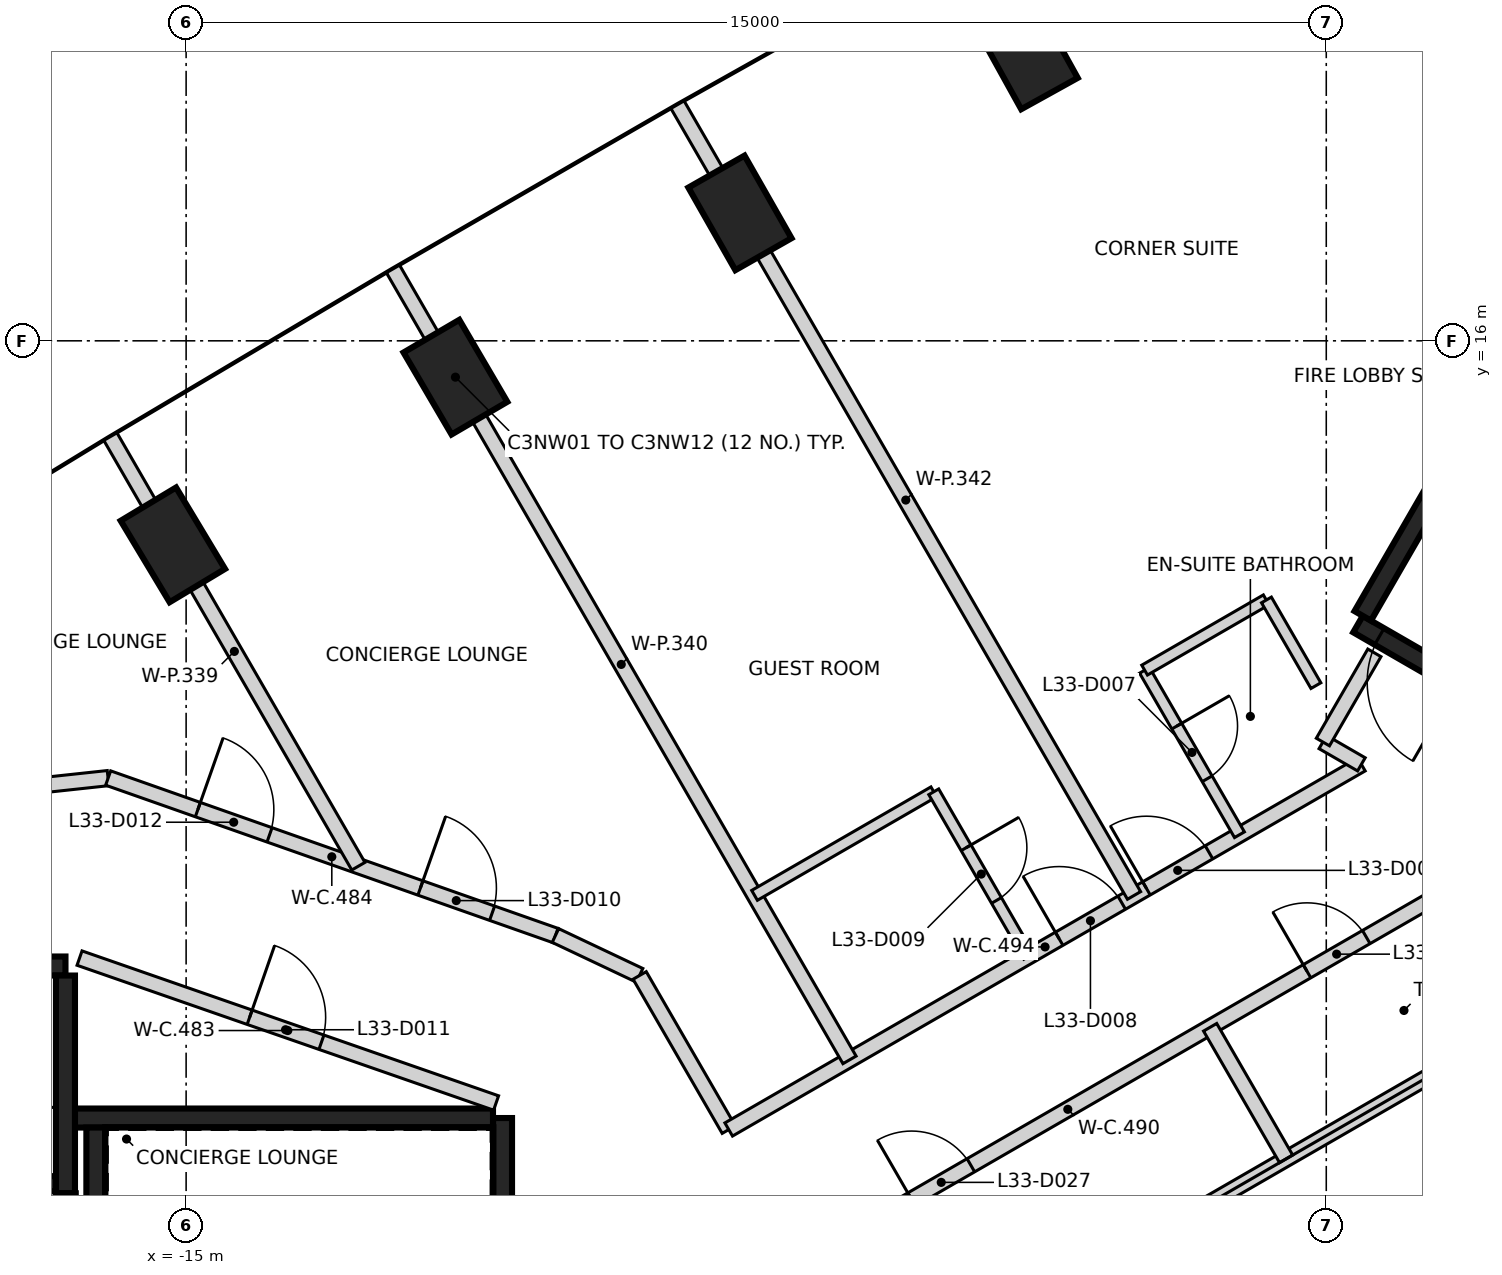
"""IFC4 building model, lengths in metres.
Left out: names, types, materials, properties, quantities, classifications, styles, units other than length and angle.
Written with IfcOpenShell. Run it as: python <this file> out.ifc"""

import sys

from ifc_helpers import new_model, si_unit, direction, frame, frame_2d, origin, origin_2d, place, context, subcontext, project, spatial, rectangle, extrude, element, fill, save


model = new_model("IFC4")
c1 = context("Model", 3, precision=1e-05, world=origin(), true_north=direction((0.0, 1.0)))
c2 = subcontext(c1, "Body", "Model", "MODEL_VIEW")
j1 = project(units=[si_unit("LENGTHUNIT", "METRE"), si_unit("PLANEANGLEUNIT", "RADIAN")], contexts=[c1])
p1 = place(None, origin())
s1 = spatial("IfcSite", under=j1, at=p1, CompositionType="ELEMENT")
p2 = place(p1, origin())
s2 = spatial("IfcBuilding", under=s1, at=p2, CompositionType="ELEMENT")
p3 = place(p2, frame((0.0, 0.0, 136.0)))
s3 = spatial("IfcBuildingStorey", under=s2, at=p3, CompositionType="ELEMENT", Elevation=136.0)
for number, where, z_axis, x_axis in (
    (1, (-3.945, 19.8, -0.4), (0.0, 0.0, 1.0), (-0.485, 0.875, 0.0)),
    (2, (-7.714, 17.683, -0.4), (0.0, 0.0, 1.0), (-0.495, 0.869, 0.0)),
    (3, (-11.457, 15.522, -0.4), (0.0, 0.0, 1.0), (-0.505, 0.863, 0.0)),
    (4, (-15.175, 13.316, -0.4), (0.0, 0.0, 1.0), (-0.515, 0.857, 0.0)),
):
    element("IfcColumn", number, at=place(p3, frame(where, z_axis=z_axis, x_axis=x_axis)), inside=s3, PredefinedType="COLUMN", context=c2, shape_type="SweptSolid", body=[
        extrude(rectangle(XDim=1.25, YDim=0.85, at=origin_2d()), origin(), (0.0, 0.0, 1.0), 3.6),
    ])
p4 = place(p3, frame((-10.837, 5.775, 0.0), z_axis=(0.0, 0.0, 1.0), x_axis=(0.0, -1.0, 0.0)))
e5 = element("IfcWall", 5, at=p4, inside=s3, PredefinedType="SHEAR", context=c2, shape_type="SweptSolid", body=[
    extrude(rectangle(XDim=11.55, YDim=0.25, at=frame_2d((5.775, 0.0))), origin(), (0.0, 0.0, 1.0), 3.2),
])
p5 = place(p4, frame((10.025, 0.0, 0.0)))
e6 = element("IfcOpeningElement", 6, at=p5, cuts=e5, PredefinedType="OPENING", context=c2, shape_type="SweptSolid", body=[
    extrude(rectangle(XDim=1.2, YDim=2.1, at=frame_2d((0.6, 1.05))), frame((0.0, 0.135, 0.0), z_axis=(0.0, -1.0, 0.0), x_axis=(1.0, 0.0, 0.0)), (0.0, 0.0, 1.0), 0.27),
])
p6 = place(p4, frame((8.725, 0.0, 0.0)))
e7 = element("IfcOpeningElement", 7, at=p6, cuts=e5, PredefinedType="OPENING", context=c2, shape_type="SweptSolid", body=[
    extrude(rectangle(XDim=1.2, YDim=2.1, at=frame_2d((0.6, 1.05))), frame((0.0, 0.135, 0.0), z_axis=(0.0, -1.0, 0.0), x_axis=(1.0, 0.0, 0.0)), (0.0, 0.0, 1.0), 0.27),
])
p7 = place(p3, frame((-16.472, 5.775, 0.0), z_axis=(0.0, 0.0, 1.0), x_axis=(1.0, 0.0, 0.0)))
e8 = element("IfcWall", 8, at=p7, inside=s3, PredefinedType="SHEAR", context=c2, shape_type="SweptSolid", body=[
    extrude(rectangle(XDim=5.51, YDim=0.25, at=frame_2d((2.755, 0.0))), origin(), (0.0, 0.0, 1.0), 3.2),
])
p8 = place(p3, frame((-19.637, 7.775, 0.0), z_axis=(0.0, 0.0, 1.0), x_axis=(1.0, 0.0, 0.0)))
e9 = element("IfcWall", 9, at=p8, inside=s3, PredefinedType="SHEAR", context=c2, shape_type="SweptSolid", body=[
    extrude(rectangle(XDim=3.05, YDim=0.25, at=frame_2d((1.525, 0.0))), origin(), (0.0, 0.0, 1.0), 3.2),
])
p9 = place(p3, frame((-16.587, 7.65, 0.0), z_axis=(0.0, 0.0, 1.0), x_axis=(0.0, -1.0, 0.0)))
e10 = element("IfcWall", 10, at=p9, inside=s3, PredefinedType="SHEAR", context=c2, shape_type="SweptSolid", body=[
    extrude(rectangle(XDim=2.865, YDim=0.25, at=frame_2d((1.432, 0.0))), origin(), (0.0, 0.0, 1.0), 3.2),
])
p10 = place(p3, frame((-16.187, 3.2, 0.0), z_axis=(0.0, 0.0, 1.0), x_axis=(0.0, 1.0, 0.0)))
e11 = element("IfcWall", 11, at=p10, inside=s3, PredefinedType="SHEAR", context=c2, shape_type="SweptSolid", body=[
    extrude(rectangle(XDim=2.449, YDim=0.25, at=frame_2d((1.225, 0.0))), origin(), (0.0, 0.0, 1.0), 3.2),
])
p11 = place(p3, frame((-16.577, 4.785, 0.0), z_axis=(0.0, 0.0, 1.0), x_axis=(0.0, -1.0, 0.0)))
e12 = element("IfcWall", 12, at=p11, inside=s3, PredefinedType="SHEAR", context=c2, shape_type="SweptSolid", body=[
    extrude(rectangle(XDim=0.344, YDim=0.25, at=frame_2d((0.172, 0.0))), origin(), (0.0, 0.0, 1.0), 3.2),
])
p12 = place(p3, frame((-19.511, 4.91, 0.0), z_axis=(0.0, 0.0, 1.0), x_axis=(1.0, 0.0, 0.0)))
e13 = element("IfcWall", 13, at=p12, inside=s3, PredefinedType="SHEAR", context=c2, shape_type="SweptSolid", body=[
    extrude(rectangle(XDim=2.798, YDim=0.2, at=frame_2d((1.399, 0.0))), origin(), (0.0, 0.0, 1.0), 3.2),
])
p13 = place(p12, frame((0.949, 0.0, 0.0)))
e14 = element("IfcOpeningElement", 14, at=p13, cuts=e13, PredefinedType="OPENING", context=c2, shape_type="SweptSolid", body=[
    extrude(rectangle(XDim=0.9, YDim=2.1, at=frame_2d((0.45, 1.05))), frame((0.0, 0.11, 0.0), z_axis=(0.0, -1.0, 0.0), x_axis=(1.0, 0.0, 0.0)), (0.0, 0.0, 1.0), 0.22),
])
p14 = place(p3, frame((10.42, 6.498, 0.0), z_axis=(0.0, 0.0, 1.0), x_axis=(-0.866021906294, 0.500006057782, 0.0)))
e15 = element("IfcWall", 15, at=p14, inside=s3, PredefinedType="SHEAR", context=c2, shape_type="SweptSolid", body=[
    extrude(rectangle(XDim=11.55, YDim=0.25, at=frame_2d((5.775, 0.0))), origin(), (0.0, 0.0, 1.0), 3.2),
])
p15 = place(p14, frame((10.025, 0.0, 0.0)))
e16 = element("IfcOpeningElement", 16, at=p15, cuts=e15, PredefinedType="OPENING", context=c2, shape_type="SweptSolid", body=[
    extrude(rectangle(XDim=1.2, YDim=2.1, at=frame_2d((0.6, 1.05))), frame((0.0, 0.135, 0.0), z_axis=(0.0, -1.0, 0.0), x_axis=(1.0, 0.0, 0.0)), (0.0, 0.0, 1.0), 0.27),
])
p16 = place(p14, frame((8.725, 0.0, 0.0)))
e17 = element("IfcOpeningElement", 17, at=p16, cuts=e15, PredefinedType="OPENING", context=c2, shape_type="SweptSolid", body=[
    extrude(rectangle(XDim=1.2, YDim=2.1, at=frame_2d((0.6, 1.05))), frame((0.0, 0.135, 0.0), z_axis=(0.0, -1.0, 0.0), x_axis=(1.0, 0.0, 0.0)), (0.0, 0.0, 1.0), 0.27),
])
p17 = place(p3, frame((0.48, 12.381, 0.0), z_axis=(0.0, 0.0, 1.0), x_axis=(0.49999885962, 0.866026062182, 0.0)))
e18 = element("IfcWall", 18, at=p17, inside=s3, PredefinedType="SHEAR", context=c2, shape_type="SweptSolid", body=[
    extrude(rectangle(XDim=5.225, YDim=0.25, at=frame_2d((2.612, 0.0))), origin(), (0.0, 0.0, 1.0), 3.2),
])
p18 = place(p3, frame((-18.865, 9.941, 0.0), z_axis=(0.0, 0.0, 1.0), x_axis=(0.99423123086, 0.107257911519, 0.0)))
e19 = element("IfcWall", 19, at=p18, inside=s3, PredefinedType="PARTITIONING", context=c2, shape_type="SweptSolid", body=[
    extrude(rectangle(XDim=2.854, YDim=0.2, at=frame_2d((1.427, 0.0))), origin(), (0.0, 0.0, 1.0), 3.2),
])
p19 = place(p3, frame((-16.402, 7.879, 0.0), z_axis=(0.0, 0.0, 1.0), x_axis=(0.944492255471, -0.328533680702, 0.0)))
e20 = element("IfcWall", 20, at=p19, inside=s3, PredefinedType="PARTITIONING", context=c2, shape_type="SweptSolid", body=[
    extrude(rectangle(XDim=5.802, YDim=0.2, at=frame_2d((2.901, 0.0))), origin(), (0.0, 0.0, 1.0), 3.2),
])
p20 = place(p19, frame((2.37, 0.0, 0.0)))
e21 = element("IfcOpeningElement", 21, at=p20, cuts=e20, PredefinedType="OPENING", context=c2, shape_type="SweptSolid", body=[
    extrude(rectangle(XDim=1.0, YDim=2.1, at=frame_2d((0.5, 1.05))), frame((0.0, 0.11, 0.0), z_axis=(0.0, -1.0, 0.0), x_axis=(1.0, 0.0, 0.0)), (0.0, 0.0, 1.0), 0.22),
])
p21 = place(p3, frame((-16.026, 10.248, 0.0), z_axis=(0.0, 0.0, 1.0), x_axis=(0.943234993827, -0.332126100179, 0.0)))
e22 = element("IfcWall", 22, at=p21, inside=s3, PredefinedType="PARTITIONING", context=c2, shape_type="SweptSolid", body=[
    extrude(rectangle(XDim=6.239, YDim=0.2, at=frame_2d((3.119, 0.0))), origin(), (0.0, 0.0, 1.0), 3.2),
])
p22 = place(p21, frame((4.355, 0.0, 0.0)))
e23 = element("IfcOpeningElement", 23, at=p22, cuts=e22, PredefinedType="OPENING", context=c2, shape_type="SweptSolid", body=[
    extrude(rectangle(XDim=1.0, YDim=2.1, at=frame_2d((0.5, 1.05))), frame((0.0, 0.11, 0.0), z_axis=(0.0, -1.0, 0.0), x_axis=(1.0, 0.0, 0.0)), (0.0, 0.0, 1.0), 0.22),
])
p23 = place(p21, frame((1.251, 0.0, 0.0)))
e24 = element("IfcOpeningElement", 24, at=p23, cuts=e22, PredefinedType="OPENING", context=c2, shape_type="SweptSolid", body=[
    extrude(rectangle(XDim=1.0, YDim=2.1, at=frame_2d((0.5, 1.05))), frame((0.0, 0.11, 0.0), z_axis=(0.0, -1.0, 0.0), x_axis=(1.0, 0.0, 0.0)), (0.0, 0.0, 1.0), 0.22),
])
p24 = place(p3, frame((-10.141, 8.176, 0.0), z_axis=(0.0, 0.0, 1.0), x_axis=(0.903904169039, -0.427735026849, 0.0)))
e25 = element("IfcWall", 25, at=p24, inside=s3, PredefinedType="PARTITIONING", context=c2, shape_type="SweptSolid", body=[
    extrude(rectangle(XDim=1.225, YDim=0.2, at=frame_2d((0.612, 0.0))), origin(), (0.0, 0.0, 1.0), 3.2),
])
p25 = place(p3, frame((-9.033, 7.651, 0.0), z_axis=(0.0, 0.0, 1.0), x_axis=(0.500354010599, -0.865820919173, 0.0)))
e26 = element("IfcWall", 26, at=p25, inside=s3, PredefinedType="PARTITIONING", context=c2, shape_type="SweptSolid", body=[
    extrude(rectangle(XDim=2.342, YDim=0.2, at=frame_2d((1.171, 0.0))), origin(), (0.0, 0.0, 1.0), 3.2),
])
p26 = place(p3, frame((-8.613, 2.881, 0.0), z_axis=(0.0, 0.0, 1.0), x_axis=(0.866103179807, 0.499865263774, 0.0)))
e27 = element("IfcWall", 27, at=p26, inside=s3, PredefinedType="PARTITIONING", context=c2, shape_type="SweptSolid", body=[
    extrude(rectangle(XDim=12.036, YDim=0.2, at=frame_2d((6.018, 0.0))), origin(), (0.0, 0.0, 1.0), 3.2),
])
p27 = place(p26, frame((9.652, 0.0, 0.0)))
e28 = element("IfcOpeningElement", 28, at=p27, cuts=e27, PredefinedType="OPENING", context=c2, shape_type="SweptSolid", body=[
    extrude(rectangle(XDim=0.9, YDim=2.1, at=frame_2d((0.45, 1.05))), frame((0.0, 0.11, 0.0), z_axis=(0.0, -1.0, 0.0), x_axis=(1.0, 0.0, 0.0)), (0.0, 0.0, 1.0), 0.22),
])
p28 = place(p26, frame((3.646, 0.0, 0.0)))
e29 = element("IfcOpeningElement", 29, at=p28, cuts=e27, PredefinedType="OPENING", context=c2, shape_type="SweptSolid", body=[
    extrude(rectangle(XDim=0.9, YDim=2.1, at=frame_2d((0.45, 1.05))), frame((0.0, 0.11, 0.0), z_axis=(0.0, -1.0, 0.0), x_axis=(1.0, 0.0, 0.0)), (0.0, 0.0, 1.0), 0.22),
])
p29 = place(p3, frame((-7.862, 5.624, 0.0), z_axis=(0.0, 0.0, 1.0), x_axis=(0.866109024618, 0.499855136491, 0.0)))
e30 = element("IfcWall", 30, at=p29, inside=s3, PredefinedType="PARTITIONING", context=c2, shape_type="SweptSolid", body=[
    extrude(rectangle(XDim=9.61, YDim=0.2, at=frame_2d((4.805, 0.0))), origin(), (0.0, 0.0, 1.0), 3.2),
])
p30 = place(p29, frame((6.345, 0.0, 0.0)))
e31 = element("IfcOpeningElement", 31, at=p30, cuts=e30, PredefinedType="OPENING", context=c2, shape_type="SweptSolid", body=[
    extrude(rectangle(XDim=0.95, YDim=2.1, at=frame_2d((0.475, 1.05))), frame((0.0, 0.11, 0.0), z_axis=(0.0, -1.0, 0.0), x_axis=(1.0, 0.0, 0.0)), (0.0, 0.0, 1.0), 0.22),
])
p31 = place(p29, frame((5.02, 0.0, 0.0)))
e32 = element("IfcOpeningElement", 32, at=p31, cuts=e30, PredefinedType="OPENING", context=c2, shape_type="SweptSolid", body=[
    extrude(rectangle(XDim=0.95, YDim=2.1, at=frame_2d((0.475, 1.05))), frame((0.0, 0.11, 0.0), z_axis=(0.0, -1.0, 0.0), x_axis=(1.0, 0.0, 0.0)), (0.0, 0.0, 1.0), 0.22),
])
p32 = place(p3, frame((-0.045, 10.721, 0.0), z_axis=(0.0, 0.0, 1.0), x_axis=(0.865768710998, -0.500444341617, 0.0)))
e33 = element("IfcWall", 33, at=p32, inside=s3, PredefinedType="PARTITIONING", context=c2, shape_type="SweptSolid", body=[
    extrude(rectangle(XDim=0.585, YDim=0.2, at=frame_2d((0.293, 0.0))), origin(), (0.0, 0.0, 1.0), 3.2),
])
p33 = place(p3, frame((-0.044, 10.722, 0.0), z_axis=(0.0, 0.0, 1.0), x_axis=(0.500034408226, 0.866005537274, 0.0)))
e34 = element("IfcWall", 34, at=p33, inside=s3, PredefinedType="PARTITIONING", context=c2, shape_type="SweptSolid", body=[
    extrude(rectangle(XDim=1.355, YDim=0.2, at=frame_2d((0.677, 0.0))), origin(), (0.0, 0.0, 1.0), 3.2),
])
p34 = place(p3, frame((-15.996, 14.74, 0.0), z_axis=(0.0, 0.0, 1.0), x_axis=(0.499925398456, -0.866068470722, 0.0)))
e35 = element("IfcWall", 35, at=p34, inside=s3, PredefinedType="PARTITIONING", context=c2, shape_type="SweptSolid", body=[
    extrude(rectangle(XDim=6.526, YDim=0.2, at=frame_2d((3.263, 0.0))), origin(), (0.0, 0.0, 1.0), 3.2),
])
p35 = place(p3, frame((-12.279, 16.946, 0.0), z_axis=(0.0, 0.0, 1.0), x_axis=(0.499902454835, -0.866081714187, 0.0)))
e36 = element("IfcWall", 36, at=p35, inside=s3, PredefinedType="PARTITIONING", context=c2, shape_type="SweptSolid", body=[
    extrude(rectangle(XDim=12.015, YDim=0.2, at=frame_2d((6.008, 0.0))), origin(), (0.0, 0.0, 1.0), 3.2),
])
p36 = place(p3, frame((-8.535, 19.107, 0.0), z_axis=(0.0, 0.0, 1.0), x_axis=(0.499972843048, -0.86604108229, 0.0)))
e37 = element("IfcWall", 37, at=p36, inside=s3, PredefinedType="PARTITIONING", context=c2, shape_type="SweptSolid", body=[
    extrude(rectangle(XDim=12.013, YDim=0.2, at=frame_2d((6.007, 0.0))), origin(), (0.0, 0.0, 1.0), 3.2),
])
p37 = place(p3, frame((-8.0, 0.924, 0.0), z_axis=(0.0, 0.0, 1.0), x_axis=(0.86604129137, 0.499972480886, 0.0)))
e38 = element("IfcWall", 38, at=p37, inside=s3, PredefinedType="PARTITIONING", context=c2, shape_type="SweptSolid", body=[
    extrude(rectangle(XDim=12.932, YDim=0.2, at=frame_2d((6.466, 0.0))), origin(), (0.0, 0.0, 1.0), 2.3),
])
p38 = place(p3, frame((-1.528, 6.969, 0.0), z_axis=(0.0, 0.0, 1.0), x_axis=(0.500000846469, -0.866024915075, 0.0)))
e39 = element("IfcWall", 39, at=p38, inside=s3, PredefinedType="PARTITIONING", context=c2, shape_type="SweptSolid", body=[
    extrude(rectangle(XDim=1.999, YDim=0.2, at=frame_2d((1.0, 0.0))), origin(), (0.0, 0.0, 1.0), 3.2),
])
p39 = place(p3, frame((-7.522, 8.704, 0.0), z_axis=(0.0, 0.0, 1.0), x_axis=(0.865972067821, 0.500092369221, 0.0)))
e40 = element("IfcWall", 40, at=p39, inside=s3, PredefinedType="PARTITIONING", context=c2, shape_type="SweptSolid", body=[
    extrude(rectangle(XDim=2.723, YDim=0.15, at=frame_2d((1.362, 0.0))), origin(), (0.0, 0.0, 1.0), 3.2),
])
p40 = place(p3, frame((-5.164, 10.067, 0.0), z_axis=(0.0, 0.0, 1.0), x_axis=(0.500046524342, -0.865998541277, 0.0)))
e41 = element("IfcWall", 41, at=p40, inside=s3, PredefinedType="PARTITIONING", context=c2, shape_type="SweptSolid", body=[
    extrude(rectangle(XDim=2.5, YDim=0.15, at=frame_2d((1.25, 0.0))), origin(), (0.0, 0.0, 1.0), 3.2),
])
p41 = place(p40, frame((0.85, 0.0, 0.0)))
e42 = element("IfcOpeningElement", 42, at=p41, cuts=e41, PredefinedType="OPENING", context=c2, shape_type="SweptSolid", body=[
    extrude(rectangle(XDim=0.8, YDim=2.1, at=frame_2d((0.4, 1.05))), frame((0.0, 0.085, 0.0), z_axis=(0.0, -1.0, 0.0), x_axis=(1.0, 0.0, 0.0)), (0.0, 0.0, 1.0), 0.17),
])
p42 = place(p3, frame((-2.391, 11.665, 0.0), z_axis=(0.0, 0.0, 1.0), x_axis=(0.500049599607, -0.865996765544, 0.0)))
e43 = element("IfcWall", 43, at=p42, inside=s3, PredefinedType="PARTITIONING", context=c2, shape_type="SweptSolid", body=[
    extrude(rectangle(XDim=2.498, YDim=0.15, at=frame_2d((1.249, 0.0))), origin(), (0.0, 0.0, 1.0), 3.2),
])
p43 = place(p42, frame((0.848, 0.0, 0.0)))
e44 = element("IfcOpeningElement", 44, at=p43, cuts=e43, PredefinedType="OPENING", context=c2, shape_type="SweptSolid", body=[
    extrude(rectangle(XDim=0.8, YDim=2.1, at=frame_2d((0.4, 1.05))), frame((0.0, 0.085, 0.0), z_axis=(0.0, -1.0, 0.0), x_axis=(1.0, 0.0, 0.0)), (0.0, 0.0, 1.0), 0.17),
])
p44 = place(p3, frame((-2.39, 11.668, 0.0), z_axis=(0.0, 0.0, 1.0), x_axis=(0.865932482239, 0.500160910312, 0.0)))
e45 = element("IfcWall", 45, at=p44, inside=s3, PredefinedType="PARTITIONING", context=c2, shape_type="SweptSolid", body=[
    extrude(rectangle(XDim=1.848, YDim=0.15, at=frame_2d((0.924, 0.0))), origin(), (0.0, 0.0, 1.0), 3.2),
])
p45 = place(p3, frame((-0.787, 12.591, 0.0), z_axis=(0.0, 0.0, 1.0), x_axis=(0.499749509877, -0.866169976031, 0.0)))
e46 = element("IfcWall", 46, at=p45, inside=s3, PredefinedType="PARTITIONING", context=c2, shape_type="SweptSolid", body=[
    extrude(rectangle(XDim=1.302, YDim=0.15, at=frame_2d((0.651, 0.0))), origin(), (0.0, 0.0, 1.0), 3.2),
])
p46 = place(p15, origin())
e47 = element("IfcDoor", 47, at=p46, inside=s3, OperationType="SINGLE_SWING_LEFT", PredefinedType="DOOR", context=c2, shape_type="SweptSolid", body=[
    extrude(rectangle(XDim=1.2, YDim=2.1, at=frame_2d((0.6, 1.05))), frame((0.0, 0.025, 0.0), z_axis=(0.0, -1.0, 0.0), x_axis=(1.0, 0.0, 0.0)), (0.0, 0.0, 1.0), 0.05),
])
fill(e16, e47)
p47 = place(p30, origin())
e48 = element("IfcDoor", 48, at=p47, inside=s3, OperationType="SINGLE_SWING_LEFT", PredefinedType="DOOR", context=c2, shape_type="SweptSolid", body=[
    extrude(rectangle(XDim=0.95, YDim=2.1, at=frame_2d((0.475, 1.05))), frame((0.0, 0.025, 0.0), z_axis=(0.0, -1.0, 0.0), x_axis=(1.0, 0.0, 0.0)), (0.0, 0.0, 1.0), 0.05),
])
fill(e31, e48)
p48 = place(p43, origin())
e49 = element("IfcDoor", 49, at=p48, inside=s3, OperationType="SINGLE_SWING_LEFT", PredefinedType="DOOR", context=c2, shape_type="SweptSolid", body=[
    extrude(rectangle(XDim=0.8, YDim=2.1, at=frame_2d((0.4, 1.05))), frame((0.0, 0.025, 0.0), z_axis=(0.0, -1.0, 0.0), x_axis=(1.0, 0.0, 0.0)), (0.0, 0.0, 1.0), 0.05),
])
fill(e44, e49)
p49 = place(p31, origin())
e50 = element("IfcDoor", 50, at=p49, inside=s3, OperationType="SINGLE_SWING_LEFT", PredefinedType="DOOR", context=c2, shape_type="SweptSolid", body=[
    extrude(rectangle(XDim=0.95, YDim=2.1, at=frame_2d((0.475, 1.05))), frame((0.0, 0.025, 0.0), z_axis=(0.0, -1.0, 0.0), x_axis=(1.0, 0.0, 0.0)), (0.0, 0.0, 1.0), 0.05),
])
fill(e32, e50)
p50 = place(p41, frame((0.8, 0.0, 0.0), z_axis=(0.0, 0.0, 1.0), x_axis=(-1.0, 0.0, 0.0)))
e51 = element("IfcDoor", 51, at=p50, inside=s3, OperationType="SINGLE_SWING_LEFT", PredefinedType="DOOR", context=c2, shape_type="SweptSolid", body=[
    extrude(rectangle(XDim=0.8, YDim=2.1, at=frame_2d((0.4, 1.05))), frame((0.0, 0.025, 0.0), z_axis=(0.0, -1.0, 0.0), x_axis=(1.0, 0.0, 0.0)), (0.0, 0.0, 1.0), 0.05),
])
fill(e42, e51)
p51 = place(p22, origin())
e52 = element("IfcDoor", 52, at=p51, inside=s3, OperationType="SINGLE_SWING_LEFT", PredefinedType="DOOR", context=c2, shape_type="SweptSolid", body=[
    extrude(rectangle(XDim=1.0, YDim=2.1, at=frame_2d((0.5, 1.05))), frame((0.0, 0.025, 0.0), z_axis=(0.0, -1.0, 0.0), x_axis=(1.0, 0.0, 0.0)), (0.0, 0.0, 1.0), 0.05),
])
fill(e23, e52)
p52 = place(p20, frame((1.0, 0.0, 0.0), z_axis=(0.0, 0.0, 1.0), x_axis=(-1.0, 0.0, 0.0)))
e53 = element("IfcDoor", 53, at=p52, inside=s3, OperationType="SINGLE_SWING_LEFT", PredefinedType="DOOR", context=c2, shape_type="SweptSolid", body=[
    extrude(rectangle(XDim=1.0, YDim=2.1, at=frame_2d((0.5, 1.05))), frame((0.0, 0.025, 0.0), z_axis=(0.0, -1.0, 0.0), x_axis=(1.0, 0.0, 0.0)), (0.0, 0.0, 1.0), 0.05),
])
fill(e21, e53)
p53 = place(p23, origin())
e54 = element("IfcDoor", 54, at=p53, inside=s3, OperationType="SINGLE_SWING_LEFT", PredefinedType="DOOR", context=c2, shape_type="SweptSolid", body=[
    extrude(rectangle(XDim=1.0, YDim=2.1, at=frame_2d((0.5, 1.05))), frame((0.0, 0.025, 0.0), z_axis=(0.0, -1.0, 0.0), x_axis=(1.0, 0.0, 0.0)), (0.0, 0.0, 1.0), 0.05),
])
fill(e24, e54)
p54 = place(p27, frame((0.9, 0.0, 0.0), z_axis=(0.0, 0.0, 1.0), x_axis=(-1.0, 0.0, 0.0)))
e55 = element("IfcDoor", 55, at=p54, inside=s3, OperationType="SINGLE_SWING_LEFT", PredefinedType="DOOR", context=c2, shape_type="SweptSolid", body=[
    extrude(rectangle(XDim=0.9, YDim=2.1, at=frame_2d((0.45, 1.05))), frame((0.0, 0.025, 0.0), z_axis=(0.0, -1.0, 0.0), x_axis=(1.0, 0.0, 0.0)), (0.0, 0.0, 1.0), 0.05),
])
fill(e28, e55)
p55 = place(p28, frame((0.9, 0.0, 0.0), z_axis=(0.0, 0.0, 1.0), x_axis=(-1.0, 0.0, 0.0)))
e56 = element("IfcDoor", 56, at=p55, inside=s3, OperationType="SINGLE_SWING_LEFT", PredefinedType="DOOR", context=c2, shape_type="SweptSolid", body=[
    extrude(rectangle(XDim=0.9, YDim=2.1, at=frame_2d((0.45, 1.05))), frame((0.0, 0.025, 0.0), z_axis=(0.0, -1.0, 0.0), x_axis=(1.0, 0.0, 0.0)), (0.0, 0.0, 1.0), 0.05),
])
fill(e29, e56)
save(model, sys.argv[1])
